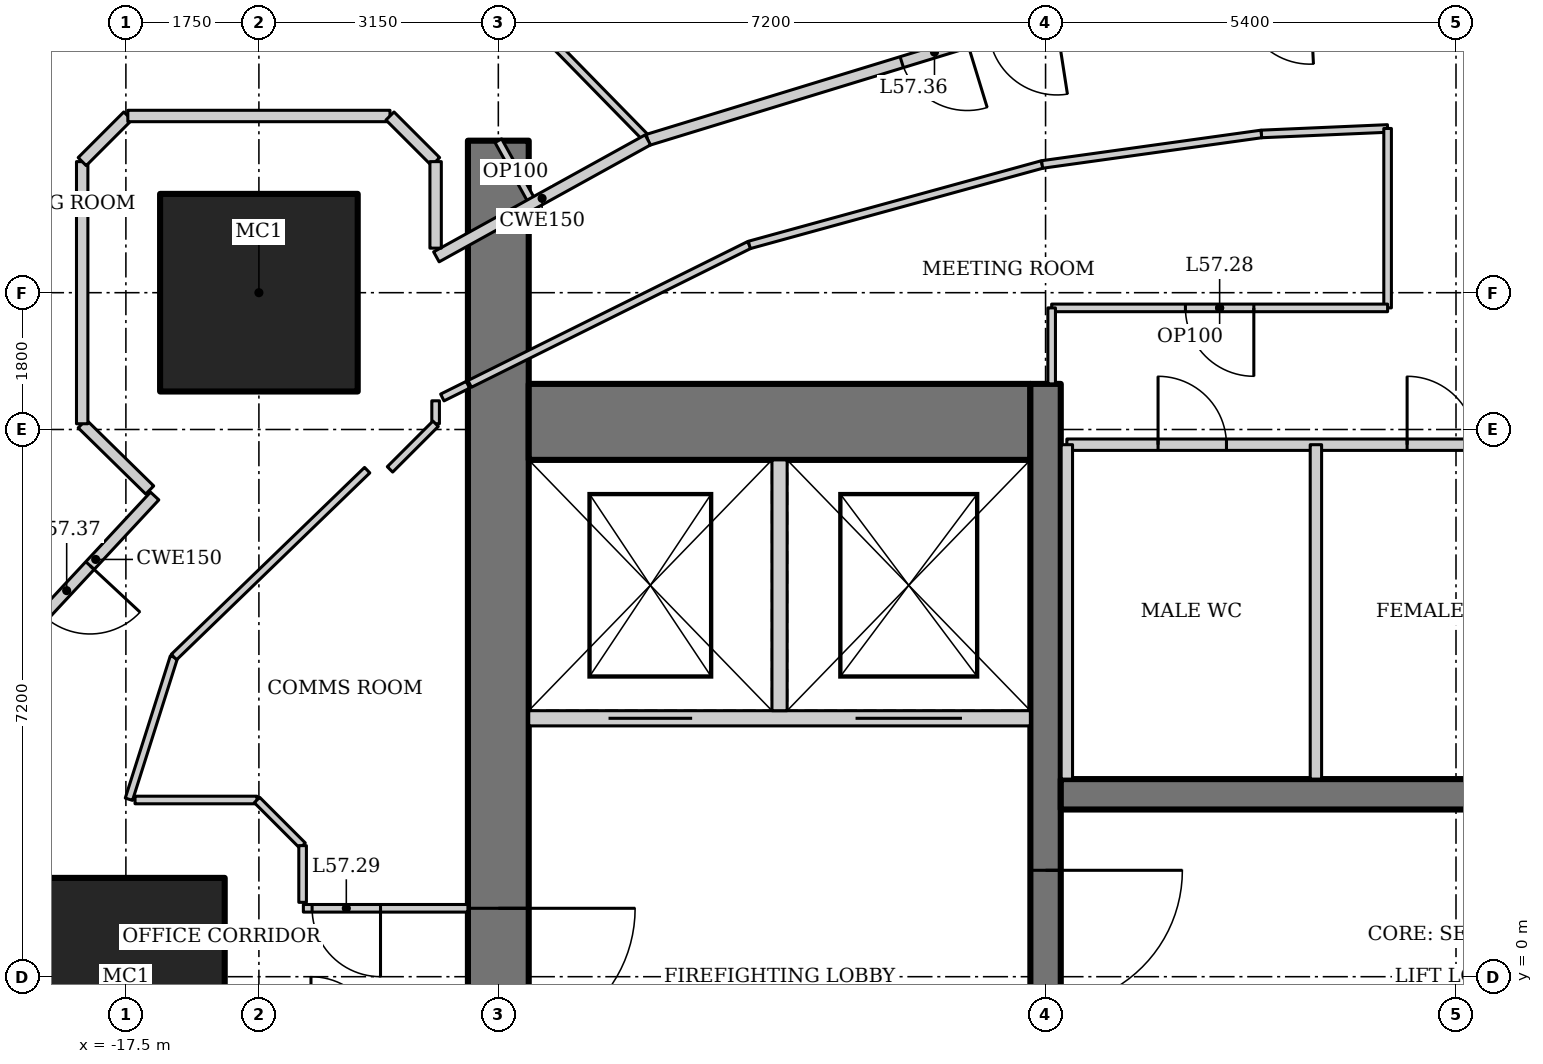
"""IFC4 building model, lengths in metres.
Left out: names, types, materials, properties, quantities, classifications, styles, units other than length and angle.
Written with IfcOpenShell. Run it as: python <this file> out.ifc"""

import sys

from ifc_helpers import new_model, si_unit, direction, frame, frame_2d, origin, origin_2d, place, context, subcontext, project, spatial, rectangle, hollow_rectangle, extrude, element, fill, save


model = new_model("IFC4")
c1 = context("Model", 3, precision=1e-05, world=origin(), true_north=direction((0.0, 1.0)))
c2 = subcontext(c1, "Body", "Model", "MODEL_VIEW")
j1 = project(units=[si_unit("LENGTHUNIT", "METRE"), si_unit("PLANEANGLEUNIT", "RADIAN")], contexts=[c1])
p1 = place(None, origin())
s1 = spatial("IfcSite", under=j1, at=p1, CompositionType="ELEMENT")
p2 = place(p1, origin())
s2 = spatial("IfcBuilding", under=s1, at=p2, CompositionType="ELEMENT")
p3 = place(p2, frame((0.0, 0.0, 245.2)))
s3 = spatial("IfcBuildingStorey", under=s2, at=p3, CompositionType="ELEMENT", Elevation=245.2)
for number, where, z_axis, x_axis in (
    (1, (-15.75, 9.0, 0.0), (0.0, 0.0, 1.0), (1.0, 0.0, 0.0)),
    (2, (-17.5, 0.0, 0.0), (0.0, 0.0, 1.0), (1.0, 0.0, 0.0)),
):
    element("IfcColumn", number, at=place(p3, frame(where, z_axis=z_axis, x_axis=x_axis)), inside=s3, PredefinedType="COLUMN", context=c2, shape_type="SweptSolid", body=[
        extrude(hollow_rectangle(XDim=2.6, YDim=2.6, WallThickness=0.13, at=origin_2d()), origin(), (0.0, 0.0, 1.0), 4.2),
    ])
p4 = place(p3, frame((-12.6, 11.0, 0.0), z_axis=(0.0, 0.0, 1.0), x_axis=(0.0, -1.0, 0.0)))
e3 = element("IfcWall", 3, at=p4, inside=s3, PredefinedType="SHEAR", context=c2, shape_type="SweptSolid", body=[
    extrude(rectangle(XDim=22.0, YDim=0.8, at=frame_2d((11.0, 0.0))), origin(), (0.0, 0.0, 1.0), 4.2),
])
p5 = place(p4, frame((10.1, 0.0, 0.0)))
e4 = element("IfcOpeningElement", 4, at=p5, cuts=e3, PredefinedType="OPENING", context=c2, shape_type="SweptSolid", body=[
    extrude(rectangle(XDim=1.8, YDim=2.1, at=frame_2d((0.9, 1.05))), frame((0.0, 0.41, 0.0), z_axis=(0.0, -1.0, 0.0), x_axis=(1.0, 0.0, 0.0)), (0.0, 0.0, 1.0), 0.82),
])
p6 = place(p3, frame((-5.6, 7.3, 0.0), z_axis=(0.0, 0.0, 1.0), x_axis=(-1.0, 0.0, 0.0)))
e5 = element("IfcWall", 5, at=p6, inside=s3, PredefinedType="SHEAR", context=c2, shape_type="SweptSolid", body=[
    extrude(rectangle(XDim=6.6, YDim=1.0, at=frame_2d((3.3, 0.0))), origin(), (0.0, 0.0, 1.0), 4.2),
])
p7 = place(p3, frame((-5.4, 7.8, 0.0), z_axis=(0.0, 0.0, 1.0), x_axis=(0.0, -1.0, 0.0)))
e6 = element("IfcWall", 6, at=p7, inside=s3, PredefinedType="SHEAR", context=c2, shape_type="SweptSolid", body=[
    extrude(rectangle(XDim=14.6, YDim=0.4, at=frame_2d((7.3, 0.0))), origin(), (0.0, 0.0, 1.0), 4.2),
])
p8 = place(p7, frame((6.4, 0.0, 0.0)))
e7 = element("IfcOpeningElement", 7, at=p8, cuts=e6, PredefinedType="OPENING", context=c2, shape_type="SweptSolid", body=[
    extrude(rectangle(XDim=1.8, YDim=2.1, at=frame_2d((0.9, 1.05))), frame((0.0, 0.21, 0.0), z_axis=(0.0, -1.0, 0.0), x_axis=(1.0, 0.0, 0.0)), (0.0, 0.0, 1.0), 0.42),
])
p9 = place(p3, frame((5.2, 2.4, 0.0), z_axis=(0.0, 0.0, 1.0), x_axis=(-1.0, 0.0, 0.0)))
e8 = element("IfcWall", 8, at=p9, inside=s3, PredefinedType="SHEAR", context=c2, shape_type="SweptSolid", body=[
    extrude(rectangle(XDim=10.4, YDim=0.4, at=frame_2d((5.2, 0.0))), origin(), (0.0, 0.0, 1.0), 4.2),
])
p10 = place(p3, frame((-12.2, 3.4, 0.0), z_axis=(0.0, 0.0, 1.0), x_axis=(1.0, 0.0, 0.0)))
e9 = element("IfcWall", 9, at=p10, inside=s3, PredefinedType="SOLIDWALL", context=c2, shape_type="SweptSolid", body=[
    extrude(rectangle(XDim=6.6, YDim=0.2, at=frame_2d((3.3, 0.0))), origin(), (0.0, 0.0, 1.0), 4.2),
])
p11 = place(p10, frame((1.05, 0.0, 0.0)))
e10 = element("IfcOpeningElement", 10, at=p11, cuts=e9, PredefinedType="OPENING", context=c2, shape_type="SweptSolid", body=[
    extrude(rectangle(XDim=1.1, YDim=2.2, at=frame_2d((0.55, 1.1))), frame((0.0, 0.11, 0.0), z_axis=(0.0, -1.0, 0.0), x_axis=(1.0, 0.0, 0.0)), (0.0, 0.0, 1.0), 0.22),
])
p12 = place(p10, frame((4.3, 0.0, 0.0)))
e11 = element("IfcOpeningElement", 11, at=p12, cuts=e9, PredefinedType="OPENING", context=c2, shape_type="SweptSolid", body=[
    extrude(rectangle(XDim=1.4, YDim=2.2, at=frame_2d((0.7, 1.1))), frame((0.0, 0.11, 0.0), z_axis=(0.0, -1.0, 0.0), x_axis=(1.0, 0.0, 0.0)), (0.0, 0.0, 1.0), 0.22),
])
p13 = place(p3, frame((-8.9, 3.5, 0.0), z_axis=(0.0, 0.0, 1.0), x_axis=(0.0, 1.0, 0.0)))
e12 = element("IfcWall", 12, at=p13, inside=s3, PredefinedType="SOLIDWALL", context=c2, shape_type="SweptSolid", body=[
    extrude(rectangle(XDim=3.3, YDim=0.2, at=frame_2d((1.65, 0.0))), origin(), (0.0, 0.0, 1.0), 4.2),
])
p14 = place(p3, frame((-15.709, 16.199, 0.0), z_axis=(0.0, 0.0, 1.0), x_axis=(0.699362525935, -0.714767135029, 0.0)))
e13 = element("IfcWall", 13, at=p14, inside=s3, PredefinedType="PARTITIONING", context=c2, shape_type="SweptSolid", body=[
    extrude(rectangle(XDim=7.259, YDim=0.1, at=frame_2d((3.629, 0.0))), origin(), (0.0, 0.0, 1.0), 3.41),
])
p15 = place(p3, frame((-6.288, 12.341, 0.0), z_axis=(0.0, 0.0, 1.0), x_axis=(-0.956185837153, -0.292760388079, 0.0)))
e14 = element("IfcWall", 14, at=p15, inside=s3, PredefinedType="PARTITIONING", context=c2, shape_type="SweptSolid", body=[
    extrude(rectangle(XDim=4.544, YDim=0.15, at=frame_2d((2.272, 0.0))), origin(), (0.0, 0.0, 1.0), 4.05),
])
p16 = place(p15, frame((0.15, 0.0, 0.0)))
e15 = element("IfcOpeningElement", 15, at=p16, cuts=e14, PredefinedType="OPENING", context=c2, shape_type="SweptSolid", body=[
    extrude(rectangle(XDim=0.9, YDim=2.1, at=frame_2d((0.45, 1.05))), frame((0.0, 0.085, 0.0), z_axis=(0.0, -1.0, 0.0), x_axis=(1.0, 0.0, 0.0)), (0.0, 0.0, 1.0), 0.17),
])
p17 = place(p3, frame((-5.12, 7.0, 0.0), z_axis=(0.0, 0.0, 1.0), x_axis=(1.0, 0.0, 0.0)))
e16 = element("IfcWall", 16, at=p17, inside=s3, PredefinedType="SOLIDWALL", context=c2, shape_type="SweptSolid", body=[
    extrude(rectangle(XDim=10.24, YDim=0.15, at=frame_2d((5.12, 0.0))), origin(), (0.0, 0.0, 1.0), 4.05),
])
p18 = place(p17, frame((1.2, 0.0, 0.0)))
e17 = element("IfcOpeningElement", 17, at=p18, cuts=e16, PredefinedType="OPENING", context=c2, shape_type="SweptSolid", body=[
    extrude(rectangle(XDim=0.9, YDim=2.1, at=frame_2d((0.45, 1.05))), frame((0.0, 0.085, 0.0), z_axis=(0.0, -1.0, 0.0), x_axis=(1.0, 0.0, 0.0)), (0.0, 0.0, 1.0), 0.17),
])
p19 = place(p17, frame((4.477, 0.0, 0.0)))
e18 = element("IfcOpeningElement", 18, at=p19, cuts=e16, PredefinedType="OPENING", context=c2, shape_type="SweptSolid", body=[
    extrude(rectangle(XDim=0.9, YDim=2.1, at=frame_2d((0.45, 1.05))), frame((0.0, 0.085, 0.0), z_axis=(0.0, -1.0, 0.0), x_axis=(1.0, 0.0, 0.0)), (0.0, 0.0, 1.0), 0.17),
])
p20 = place(p17, frame((7.054, 0.0, 0.0)))
e19 = element("IfcOpeningElement", 19, at=p20, cuts=e16, PredefinedType="OPENING", context=c2, shape_type="SweptSolid", body=[
    extrude(rectangle(XDim=1.0, YDim=2.1, at=frame_2d((0.5, 1.05))), frame((0.0, 0.085, 0.0), z_axis=(0.0, -1.0, 0.0), x_axis=(1.0, 0.0, 0.0)), (0.0, 0.0, 1.0), 0.17),
])
p21 = place(p17, frame((8.952, 0.0, 0.0)))
e20 = element("IfcOpeningElement", 20, at=p21, cuts=e16, PredefinedType="OPENING", context=c2, shape_type="SweptSolid", body=[
    extrude(rectangle(XDim=0.9, YDim=2.1, at=frame_2d((0.45, 1.05))), frame((0.0, 0.085, 0.0), z_axis=(0.0, -1.0, 0.0), x_axis=(1.0, 0.0, 0.0)), (0.0, 0.0, 1.0), 0.17),
])
for number, where, z_axis, x_axis in (
    (21, (-5.12, 2.6, 0.0), (0.0, 0.0, 1.0), (0.0, 1.0, 0.0)),
    (22, (-1.843, 2.6, 0.0), (0.0, 0.0, 1.0), (0.0, 1.0, 0.0)),
):
    element("IfcWall", number, at=place(p3, frame(where, z_axis=z_axis, x_axis=x_axis)), inside=s3, PredefinedType="SOLIDWALL", context=c2, shape_type="SweptSolid", body=[
        extrude(rectangle(XDim=4.4, YDim=0.15, at=frame_2d((2.2, 0.0))), origin(), (0.0, 0.0, 1.0), 4.05),
    ])
p22 = place(p3, frame((-12.977, 7.8, 0.0), z_axis=(0.0, 0.0, 1.0), x_axis=(0.895529831139, 0.445001484874, 0.0)))
e23 = element("IfcWall", 23, at=p22, inside=s3, PredefinedType="PARTITIONING", context=c2, shape_type="SweptSolid", body=[
    extrude(rectangle(XDim=4.108, YDim=0.1, at=frame_2d((2.054, 0.0))), origin(), (0.0, 0.0, 1.0), 4.05),
])
p23 = place(p3, frame((-9.298, 9.628, 0.0), z_axis=(0.0, 0.0, 1.0), x_axis=(0.964244438722, 0.265014456954, 0.0)))
e24 = element("IfcWall", 24, at=p23, inside=s3, PredefinedType="PARTITIONING", context=c2, shape_type="SweptSolid", body=[
    extrude(rectangle(XDim=3.995, YDim=0.1, at=frame_2d((1.998, 0.0))), origin(), (0.0, 0.0, 1.0), 4.05),
])
p24 = place(p3, frame((-5.445, 10.687, 0.0), z_axis=(0.0, 0.0, 1.0), x_axis=(0.99045099049, 0.137865280027, 0.0)))
e25 = element("IfcWall", 25, at=p24, inside=s3, PredefinedType="PARTITIONING", context=c2, shape_type="SweptSolid", body=[
    extrude(rectangle(XDim=2.913, YDim=0.1, at=frame_2d((1.457, 0.0))), origin(), (0.0, 0.0, 1.0), 4.05),
])
p25 = place(p3, frame((-2.56, 11.089, 0.0), z_axis=(0.0, 0.0, 1.0), x_axis=(0.999053939397, 0.043488230303, 0.0)))
e26 = element("IfcWall", 26, at=p25, inside=s3, PredefinedType="PARTITIONING", context=c2, shape_type="SweptSolid", body=[
    extrude(rectangle(XDim=1.662, YDim=0.1, at=frame_2d((0.831, 0.0))), origin(), (0.0, 0.0, 1.0), 4.05),
])
p26 = place(p3, frame((-0.9, 11.161, 0.0), z_axis=(0.0, 0.0, 1.0), x_axis=(0.0, -1.0, 0.0)))
e27 = element("IfcWall", 27, at=p26, inside=s3, PredefinedType="PARTITIONING", context=c2, shape_type="SweptSolid", body=[
    extrude(rectangle(XDim=2.361, YDim=0.1, at=frame_2d((1.18, 0.0))), origin(), (0.0, 0.0, 1.0), 4.05),
])
p27 = place(p3, frame((-0.9, 8.8, 0.0), z_axis=(0.0, 0.0, 1.0), x_axis=(-1.0, 0.0, 0.0)))
e28 = element("IfcWall", 28, at=p27, inside=s3, PredefinedType="PARTITIONING", context=c2, shape_type="SweptSolid", body=[
    extrude(rectangle(XDim=4.42, YDim=0.1, at=frame_2d((2.21, 0.0))), origin(), (0.0, 0.0, 1.0), 4.05),
])
p28 = place(p27, frame((1.76, 0.0, 0.0)))
e29 = element("IfcOpeningElement", 29, at=p28, cuts=e28, PredefinedType="OPENING", context=c2, shape_type="SweptSolid", body=[
    extrude(rectangle(XDim=0.9, YDim=2.1, at=frame_2d((0.45, 1.05))), frame((0.0, 0.06, 0.0), z_axis=(0.0, -1.0, 0.0), x_axis=(1.0, 0.0, 0.0)), (0.0, 0.0, 1.0), 0.12),
])
p29 = place(p3, frame((-5.32, 8.8, 0.0), z_axis=(0.0, 0.0, 1.0), x_axis=(0.0, -1.0, 0.0)))
e30 = element("IfcWall", 30, at=p29, inside=s3, PredefinedType="PARTITIONING", context=c2, shape_type="SweptSolid", body=[
    extrude(rectangle(XDim=1.0, YDim=0.1, at=frame_2d((0.5, 0.0))), origin(), (0.0, 0.0, 1.0), 4.05),
])
p30 = place(p3, frame((-13.337, 7.621, 0.0), z_axis=(0.0, 0.0, 1.0), x_axis=(0.895721570004, 0.444615416995, 0.0)))
e31 = element("IfcWall", 31, at=p30, inside=s3, PredefinedType="PARTITIONING", context=c2, shape_type="SweptSolid", body=[
    extrude(rectangle(XDim=0.376, YDim=0.1, at=frame_2d((0.188, 0.0))), origin(), (0.0, 0.0, 1.0), 4.05),
])
p31 = place(p3, frame((-12.6, 11.0, 0.0), z_axis=(0.0, 0.0, 1.0), x_axis=(0.484103558985, -0.875010710893, 0.0)))
e32 = element("IfcWall", 32, at=p31, inside=s3, PredefinedType="PARTITIONING", context=c2, shape_type="SweptSolid", body=[
    extrude(rectangle(XDim=0.943, YDim=0.1, at=frame_2d((0.472, 0.0))), origin(), (0.0, 0.0, 1.0), 4.05),
])
p32 = place(p3, frame((-13.0, 0.9, 0.0), z_axis=(0.0, 0.0, 1.0), x_axis=(-1.0, 0.0, 0.0)))
e33 = element("IfcWall", 33, at=p32, inside=s3, PredefinedType="PARTITIONING", context=c2, shape_type="SweptSolid", body=[
    extrude(rectangle(XDim=2.165, YDim=0.1, at=frame_2d((1.083, 0.0))), origin(), (0.0, 0.0, 1.0), 4.05),
])
p33 = place(p32, frame((1.15, 0.0, 0.0)))
e34 = element("IfcOpeningElement", 34, at=p33, cuts=e33, PredefinedType="OPENING", context=c2, shape_type="SweptSolid", body=[
    extrude(rectangle(XDim=0.9, YDim=2.1, at=frame_2d((0.45, 1.05))), frame((0.0, 0.06, 0.0), z_axis=(0.0, -1.0, 0.0), x_axis=(1.0, 0.0, 0.0)), (0.0, 0.0, 1.0), 0.12),
])
p34 = place(p3, frame((-17.46, 2.335, 0.0), z_axis=(0.0, 0.0, 1.0), x_axis=(0.301821975729, 0.953364303384, 0.0)))
e35 = element("IfcWall", 35, at=p34, inside=s3, PredefinedType="PARTITIONING", context=c2, shape_type="SweptSolid", body=[
    extrude(rectangle(XDim=1.962, YDim=0.1, at=frame_2d((0.981, 0.0))), origin(), (0.0, 0.0, 1.0), 4.05),
])
p35 = place(p3, frame((-17.38, 2.325, 0.0), z_axis=(0.0, 0.0, 1.0), x_axis=(1.0, 0.0, 0.0)))
e36 = element("IfcWall", 36, at=p35, inside=s3, PredefinedType="PARTITIONING", context=c2, shape_type="SweptSolid", body=[
    extrude(rectangle(XDim=1.604, YDim=0.1, at=frame_2d((0.802, 0.0))), origin(), (0.0, 0.0, 1.0), 4.05),
])
p36 = place(p3, frame((-15.775, 2.325, 0.0), z_axis=(0.0, 0.0, 1.0), x_axis=(0.707106781187, -0.707106781187, 0.0)))
e37 = element("IfcWall", 37, at=p36, inside=s3, PredefinedType="PARTITIONING", context=c2, shape_type="SweptSolid", body=[
    extrude(rectangle(XDim=0.849, YDim=0.1, at=frame_2d((0.425, 0.0))), origin(), (0.0, 0.0, 1.0), 4.05),
])
p37 = place(p3, frame((-15.175, 1.725, 0.0), z_axis=(0.0, 0.0, 1.0), x_axis=(0.0, -1.0, 0.0)))
e38 = element("IfcWall", 38, at=p37, inside=s3, PredefinedType="PARTITIONING", context=c2, shape_type="SweptSolid", body=[
    extrude(rectangle(XDim=0.746, YDim=0.1, at=frame_2d((0.373, 0.0))), origin(), (0.0, 0.0, 1.0), 4.05),
])
p38 = place(p3, frame((-10.633, 11.01, 0.0), z_axis=(0.0, 0.0, 1.0), x_axis=(-0.875072100837, -0.483992580869, 0.0)))
e39 = element("IfcWall", 39, at=p38, inside=s3, PredefinedType="PARTITIONING", context=c2, shape_type="SweptSolid", body=[
    extrude(rectangle(XDim=3.179, YDim=0.15, at=frame_2d((1.59, 0.0))), origin(), (0.0, 0.0, 1.0), 4.05),
])
p39 = place(p3, frame((-17.121, 6.325, 0.0), z_axis=(0.0, 0.0, 1.0), x_axis=(-0.680985069419, -0.732297299755, 0.0)))
e40 = element("IfcWall", 40, at=p39, inside=s3, PredefinedType="PARTITIONING", context=c2, shape_type="SweptSolid", body=[
    extrude(rectangle(XDim=2.279, YDim=0.15, at=frame_2d((1.14, 0.0))), origin(), (0.0, 0.0, 1.0), 4.05),
])
p40 = place(p39, frame((1.25, 0.0, 0.0)))
e41 = element("IfcOpeningElement", 41, at=p40, cuts=e40, PredefinedType="OPENING", context=c2, shape_type="SweptSolid", body=[
    extrude(rectangle(XDim=0.9, YDim=2.1, at=frame_2d((0.45, 1.05))), frame((0.0, 0.085, 0.0), z_axis=(0.0, -1.0, 0.0), x_axis=(1.0, 0.0, 0.0)), (0.0, 0.0, 1.0), 0.17),
])
p41 = place(p3, frame((-16.868, 4.206, 0.0), z_axis=(0.0, 0.0, 1.0), x_axis=(0.718810161381, 0.695206409562, 0.0)))
e42 = element("IfcWall", 42, at=p41, inside=s3, PredefinedType="PARTITIONING", context=c2, shape_type="SweptSolid", body=[
    extrude(rectangle(XDim=3.537, YDim=0.1, at=frame_2d((1.769, 0.0))), origin(), (0.0, 0.0, 1.0), 4.05),
])
p42 = place(p3, frame((-13.425, 7.578, 0.0), z_axis=(0.0, 0.0, 1.0), x_axis=(0.0, -1.0, 0.0)))
e43 = element("IfcWall", 43, at=p42, inside=s3, PredefinedType="PARTITIONING", context=c2, shape_type="SweptSolid", body=[
    extrude(rectangle(XDim=0.302, YDim=0.1, at=frame_2d((0.151, 0.0))), origin(), (0.0, 0.0, 1.0), 4.05),
])
p43 = place(p3, frame((-13.425, 7.275, 0.0), z_axis=(0.0, 0.0, 1.0), x_axis=(-0.707106781187, -0.707106781187, 0.0)))
e44 = element("IfcWall", 44, at=p43, inside=s3, PredefinedType="PARTITIONING", context=c2, shape_type="SweptSolid", body=[
    extrude(rectangle(XDim=0.849, YDim=0.1, at=frame_2d((0.425, 0.0))), origin(), (0.0, 0.0, 1.0), 4.05),
])
p44 = place(p3, frame((-17.187, 6.404, 0.0), z_axis=(0.0, 0.0, 1.0), x_axis=(-0.713842064016, 0.700306723973, 0.0)))
e45 = element("IfcWall", 45, at=p44, inside=s3, PredefinedType="PARTITIONING", context=c2, shape_type="SweptSolid", body=[
    extrude(rectangle(XDim=1.245, YDim=0.15, at=frame_2d((0.622, 0.0))), origin(), (0.0, 0.0, 1.0), 4.05),
])
p45 = place(p3, frame((-18.075, 7.275, 0.0), z_axis=(0.0, 0.0, 1.0), x_axis=(0.0, 1.0, 0.0)))
e46 = element("IfcWall", 46, at=p45, inside=s3, PredefinedType="PARTITIONING", context=c2, shape_type="SweptSolid", body=[
    extrude(rectangle(XDim=3.449, YDim=0.15, at=frame_2d((1.725, 0.0))), origin(), (0.0, 0.0, 1.0), 3.601),
])
p46 = place(p3, frame((-18.075, 10.725, 0.0), z_axis=(0.0, 0.0, 1.0), x_axis=(0.707106781187, 0.707106781187, 0.0)))
e47 = element("IfcWall", 47, at=p46, inside=s3, PredefinedType="PARTITIONING", context=c2, shape_type="SweptSolid", body=[
    extrude(rectangle(XDim=0.849, YDim=0.15, at=frame_2d((0.425, 0.0))), origin(), (0.0, 0.0, 1.0), 4.05),
])
p47 = place(p3, frame((-17.475, 11.325, 0.0), z_axis=(0.0, 0.0, 1.0), x_axis=(1.0, 0.0, 0.0)))
e48 = element("IfcWall", 48, at=p47, inside=s3, PredefinedType="PARTITIONING", context=c2, shape_type="SweptSolid", body=[
    extrude(rectangle(XDim=3.449, YDim=0.15, at=frame_2d((1.725, 0.0))), origin(), (0.0, 0.0, 1.0), 4.05),
])
p48 = place(p3, frame((-14.025, 11.325, 0.0), z_axis=(0.0, 0.0, 1.0), x_axis=(0.707106781187, -0.707106781187, 0.0)))
e49 = element("IfcWall", 49, at=p48, inside=s3, PredefinedType="PARTITIONING", context=c2, shape_type="SweptSolid", body=[
    extrude(rectangle(XDim=0.849, YDim=0.15, at=frame_2d((0.425, 0.0))), origin(), (0.0, 0.0, 1.0), 4.05),
])
p49 = place(p3, frame((-13.425, 10.725, 0.0), z_axis=(0.0, 0.0, 1.0), x_axis=(0.0, -1.0, 0.0)))
e50 = element("IfcWall", 50, at=p49, inside=s3, PredefinedType="PARTITIONING", context=c2, shape_type="SweptSolid", body=[
    extrude(rectangle(XDim=1.138, YDim=0.15, at=frame_2d((0.569, 0.0))), origin(), (0.0, 0.0, 1.0), 4.05),
])
p50 = place(p8, origin())
e51 = element("IfcDoor", 51, at=p50, inside=s3, OperationType="DOUBLE_DOOR_DOUBLE_SWING", PredefinedType="DOOR", context=c2, shape_type="SweptSolid", body=[
    extrude(rectangle(XDim=1.8, YDim=2.1, at=frame_2d((0.9, 1.05))), frame((0.0, 0.025, 0.0), z_axis=(0.0, -1.0, 0.0), x_axis=(1.0, 0.0, 0.0)), (0.0, 0.0, 1.0), 0.05),
])
fill(e7, e51)
p51 = place(p5, origin())
e52 = element("IfcDoor", 52, at=p51, inside=s3, OperationType="DOUBLE_DOOR_DOUBLE_SWING", PredefinedType="DOOR", context=c2, shape_type="SweptSolid", body=[
    extrude(rectangle(XDim=1.8, YDim=2.1, at=frame_2d((0.9, 1.05))), frame((0.0, 0.025, 0.0), z_axis=(0.0, -1.0, 0.0), x_axis=(1.0, 0.0, 0.0)), (0.0, 0.0, 1.0), 0.05),
])
fill(e4, e52)
p52 = place(p11, origin())
e53 = element("IfcDoor", 53, at=p52, inside=s3, OperationType="DOUBLE_DOOR_SLIDING", PredefinedType="DOOR", context=c2, shape_type="SweptSolid", body=[
    extrude(rectangle(XDim=1.1, YDim=2.2, at=frame_2d((0.55, 1.1))), frame((0.0, 0.025, 0.0), z_axis=(0.0, -1.0, 0.0), x_axis=(1.0, 0.0, 0.0)), (0.0, 0.0, 1.0), 0.05),
])
fill(e10, e53)
p53 = place(p12, origin())
e54 = element("IfcDoor", 54, at=p53, inside=s3, OperationType="DOUBLE_DOOR_SLIDING", PredefinedType="DOOR", context=c2, shape_type="SweptSolid", body=[
    extrude(rectangle(XDim=1.4, YDim=2.2, at=frame_2d((0.7, 1.1))), frame((0.0, 0.025, 0.0), z_axis=(0.0, -1.0, 0.0), x_axis=(1.0, 0.0, 0.0)), (0.0, 0.0, 1.0), 0.05),
])
fill(e11, e54)
p54 = place(p18, origin())
e55 = element("IfcDoor", 55, at=p54, inside=s3, OperationType="SINGLE_SWING_LEFT", PredefinedType="DOOR", context=c2, shape_type="SweptSolid", body=[
    extrude(rectangle(XDim=0.9, YDim=2.1, at=frame_2d((0.45, 1.05))), frame((0.0, 0.025, 0.0), z_axis=(0.0, -1.0, 0.0), x_axis=(1.0, 0.0, 0.0)), (0.0, 0.0, 1.0), 0.05),
])
fill(e17, e55)
p55 = place(p19, origin())
e56 = element("IfcDoor", 56, at=p55, inside=s3, OperationType="SINGLE_SWING_LEFT", PredefinedType="DOOR", context=c2, shape_type="SweptSolid", body=[
    extrude(rectangle(XDim=0.9, YDim=2.1, at=frame_2d((0.45, 1.05))), frame((0.0, 0.025, 0.0), z_axis=(0.0, -1.0, 0.0), x_axis=(1.0, 0.0, 0.0)), (0.0, 0.0, 1.0), 0.05),
])
fill(e18, e56)
p56 = place(p28, origin())
e57 = element("IfcDoor", 57, at=p56, inside=s3, OperationType="SINGLE_SWING_LEFT", PredefinedType="DOOR", context=c2, shape_type="SweptSolid", body=[
    extrude(rectangle(XDim=0.9, YDim=2.1, at=frame_2d((0.45, 1.05))), frame((0.0, 0.025, 0.0), z_axis=(0.0, -1.0, 0.0), x_axis=(1.0, 0.0, 0.0)), (0.0, 0.0, 1.0), 0.05),
])
fill(e29, e57)
p57 = place(p33, origin())
e58 = element("IfcDoor", 58, at=p57, inside=s3, OperationType="SINGLE_SWING_LEFT", PredefinedType="DOOR", context=c2, shape_type="SweptSolid", body=[
    extrude(rectangle(XDim=0.9, YDim=2.1, at=frame_2d((0.45, 1.05))), frame((0.0, 0.025, 0.0), z_axis=(0.0, -1.0, 0.0), x_axis=(1.0, 0.0, 0.0)), (0.0, 0.0, 1.0), 0.05),
])
fill(e34, e58)
p58 = place(p16, origin())
e59 = element("IfcDoor", 59, at=p58, inside=s3, OperationType="SINGLE_SWING_LEFT", PredefinedType="DOOR", context=c2, shape_type="SweptSolid", body=[
    extrude(rectangle(XDim=0.9, YDim=2.1, at=frame_2d((0.45, 1.05))), frame((0.0, 0.025, 0.0), z_axis=(0.0, -1.0, 0.0), x_axis=(1.0, 0.0, 0.0)), (0.0, 0.0, 1.0), 0.05),
])
fill(e15, e59)
p59 = place(p40, origin())
e60 = element("IfcDoor", 60, at=p59, inside=s3, OperationType="SINGLE_SWING_LEFT", PredefinedType="DOOR", context=c2, shape_type="SweptSolid", body=[
    extrude(rectangle(XDim=0.9, YDim=2.1, at=frame_2d((0.45, 1.05))), frame((0.0, 0.025, 0.0), z_axis=(0.0, -1.0, 0.0), x_axis=(1.0, 0.0, 0.0)), (0.0, 0.0, 1.0), 0.05),
])
fill(e41, e60)
save(model, sys.argv[1])
